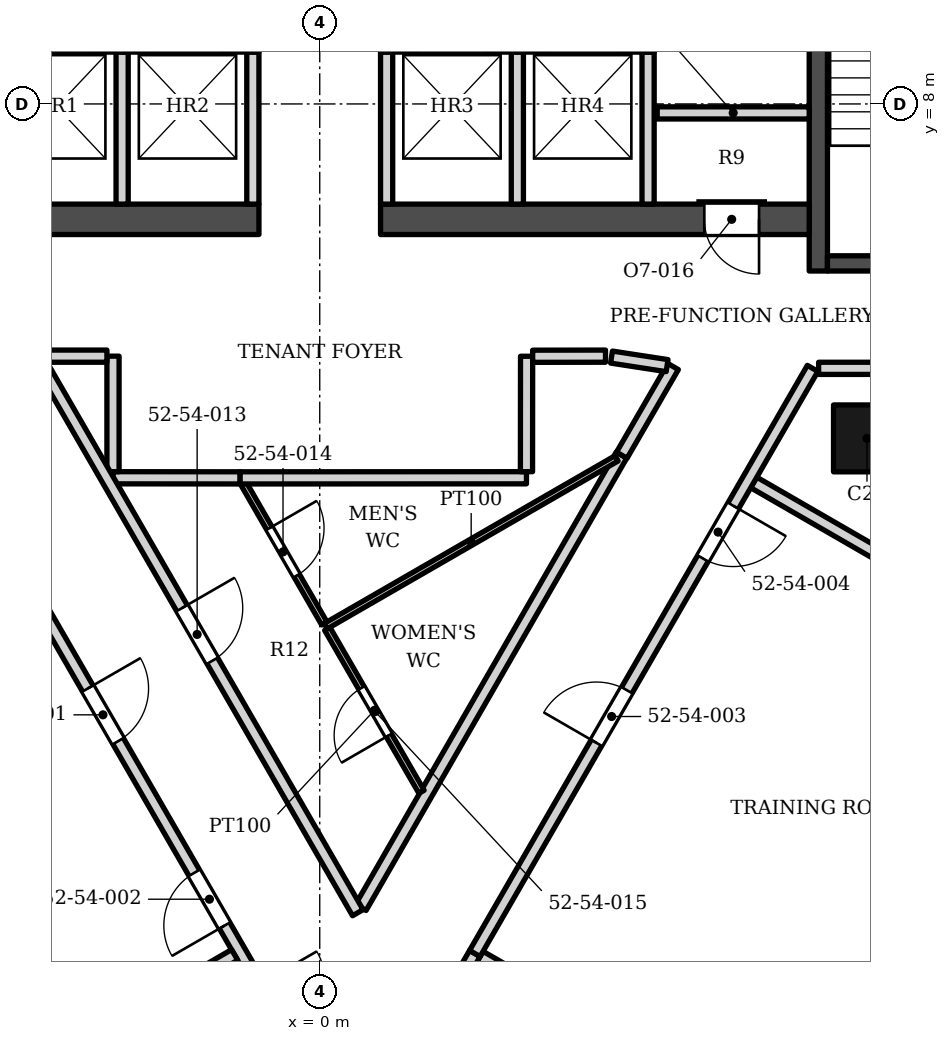
"""IFC4 building model, lengths in metres.
Left out: names, types, materials, properties, quantities, classifications, styles, units other than length and angle.
Written with IfcOpenShell. Run it as: python <this file> out.ifc"""

import sys

from ifc_helpers import new_model, si_unit, direction, frame, frame_2d, origin, origin_2d, place, context, subcontext, project, spatial, rectangle, extrude, element, fill, save


model = new_model("IFC4")
c1 = context("Model", 3, precision=1e-05, world=origin(), true_north=direction((0.0, 1.0)))
c2 = subcontext(c1, "Body", "Model", "MODEL_VIEW")
j1 = project(units=[si_unit("LENGTHUNIT", "METRE"), si_unit("PLANEANGLEUNIT", "RADIAN")], contexts=[c1])
p1 = place(None, origin())
s1 = spatial("IfcSite", under=j1, at=p1, CompositionType="ELEMENT")
p2 = place(p1, origin())
s2 = spatial("IfcBuilding", under=s1, at=p2, CompositionType="ELEMENT")
p3 = place(p2, frame((0.0, 0.0, 219.8)))
s3 = spatial("IfcBuildingStorey", under=s2, at=p3, CompositionType="ELEMENT", Elevation=219.8)
p4 = place(p3, frame((8.2, 5.253, 0.0), z_axis=(0.0, 0.0, 1.0), x_axis=(0.0, 1.0, 0.0)))
e1 = element("IfcWall", 1, at=p4, inside=s3, PredefinedType="SHEAR", context=c2, shape_type="SweptSolid", body=[
    extrude(rectangle(XDim=13.3, YDim=0.3, at=frame_2d((6.65, 0.0))), origin(), (0.0, 0.0, 1.0), 3.9),
])
p5 = place(p4, frame((7.1, 0.0, 0.0)))
e2 = element("IfcOpeningElement", 2, at=p5, cuts=e1, PredefinedType="OPENING", context=c2, shape_type="SweptSolid", body=[
    extrude(rectangle(XDim=1.4, YDim=2.1, at=frame_2d((0.7, 1.05))), frame((0.0, 0.16, 0.0), z_axis=(0.0, -1.0, 0.0), x_axis=(1.0, 0.0, 0.0)), (0.0, 0.0, 1.0), 0.32),
])
p6 = place(p4, frame((5.05, 0.0, 0.0)))
e3 = element("IfcOpeningElement", 3, at=p6, cuts=e1, PredefinedType="OPENING", context=c2, shape_type="SweptSolid", body=[
    extrude(rectangle(XDim=1.4, YDim=2.1, at=frame_2d((0.7, 1.05))), frame((0.0, 0.16, 0.0), z_axis=(0.0, -1.0, 0.0), x_axis=(1.0, 0.0, 0.0)), (0.0, 0.0, 1.0), 0.32),
])
p7 = place(p3, frame((8.35, 5.378, 0.0), z_axis=(0.0, 0.0, 1.0), x_axis=(1.0, 0.0, 0.0)))
e4 = element("IfcWall", 4, at=p7, inside=s3, PredefinedType="SHEAR", context=c2, shape_type="SweptSolid", body=[
    extrude(rectangle(XDim=3.75, YDim=0.25, at=frame_2d((1.875, 0.0))), origin(), (0.0, 0.0, 1.0), 3.9),
])
p8 = place(p3, frame((-8.05, 6.103, 0.0), z_axis=(0.0, 0.0, 1.0), x_axis=(1.0, 0.0, 0.0)))
e5 = element("IfcWall", 5, at=p8, inside=s3, PredefinedType="SHEAR", context=c2, shape_type="SweptSolid", body=[
    extrude(rectangle(XDim=7.05, YDim=0.5, at=frame_2d((3.525, 0.0))), origin(), (0.0, 0.0, 1.0), 3.9),
])
p9 = place(p8, frame((0.825, 0.0, 0.0)))
e6 = element("IfcOpeningElement", 6, at=p9, cuts=e5, PredefinedType="OPENING", context=c2, shape_type="SweptSolid", body=[
    extrude(rectangle(XDim=0.9, YDim=2.1, at=frame_2d((0.45, 1.05))), frame((0.0, 0.26, 0.0), z_axis=(0.0, -1.0, 0.0), x_axis=(1.0, 0.0, 0.0)), (0.0, 0.0, 1.0), 0.52),
])
p10 = place(p3, frame((1.0, 6.103, 0.0), z_axis=(0.0, 0.0, 1.0), x_axis=(1.0, 0.0, 0.0)))
e7 = element("IfcWall", 7, at=p10, inside=s3, PredefinedType="SHEAR", context=c2, shape_type="SweptSolid", body=[
    extrude(rectangle(XDim=7.05, YDim=0.5, at=frame_2d((3.525, 0.0))), origin(), (0.0, 0.0, 1.0), 3.9),
])
p11 = place(p10, frame((5.325, 0.0, 0.0)))
e8 = element("IfcOpeningElement", 8, at=p11, cuts=e7, PredefinedType="OPENING", context=c2, shape_type="SweptSolid", body=[
    extrude(rectangle(XDim=0.9, YDim=2.1, at=frame_2d((0.45, 1.05))), frame((0.0, 0.26, 0.0), z_axis=(0.0, -1.0, 0.0), x_axis=(1.0, 0.0, 0.0)), (0.0, 0.0, 1.0), 0.52),
])
p12 = place(p3, frame((9.0, 2.5, 0.0), z_axis=(0.0, 0.0, 1.0), x_axis=(1.0, 0.0, 0.0)))
e9 = element("IfcColumn", 9, at=p12, inside=s3, PredefinedType="COLUMN", context=c2, shape_type="SweptSolid", body=[
    extrude(rectangle(XDim=1.1, YDim=1.1, at=origin_2d()), origin(), (0.0, 0.0, 1.0), 3.9),
])
for number, where, z_axis, x_axis in (
    (10, (-3.25, 6.353, 0.0), (0.0, 0.0, 1.0), (0.0, 1.0, 0.0)),
    (11, (-1.1, 6.353, 0.0), (0.0, 0.0, 1.0), (0.0, 1.0, 0.0)),
    (12, (1.1, 6.353, 0.0), (0.0, 0.0, 1.0), (0.0, 1.0, 0.0)),
    (13, (3.25, 6.353, 0.0), (0.0, 0.0, 1.0), (0.0, 1.0, 0.0)),
    (14, (5.4, 6.353, 0.0), (0.0, 0.0, 1.0), (0.0, 1.0, 0.0)),
    (15, (5.55, 7.853, 0.0), (0.0, 0.0, 1.0), (1.0, 0.0, 0.0)),
):
    element("IfcWall", number, at=place(p3, frame(where, z_axis=z_axis, x_axis=x_axis)), inside=s3, PredefinedType="SOLIDWALL", context=c2, shape_type="SweptSolid", body=[
        extrude(rectangle(XDim=2.5, YDim=0.2, at=frame_2d((1.25, 0.0))), origin(), (0.0, 0.0, 1.0), 3.73),
    ])
p13 = place(p3, frame((2.635, -6.022, 0.0), z_axis=(0.0, 0.0, 1.0), x_axis=(0.866123944565, -0.499829283508, 0.0)))
e16 = element("IfcWall", 16, at=p13, inside=s3, PredefinedType="PARTITIONING", context=c2, shape_type="SweptSolid", body=[
    extrude(rectangle(XDim=7.65, YDim=0.2, at=frame_2d((3.825, 0.0))), origin(), (0.0, 0.0, 1.0), 2.884),
])
p14 = place(p3, frame((-5.815, 1.851, 0.0), z_axis=(0.0, 0.0, 1.0), x_axis=(0.499991042018, -0.866030575616, 0.0)))
e17 = element("IfcWall", 17, at=p14, inside=s3, PredefinedType="PARTITIONING", context=c2, shape_type="SweptSolid", body=[
    extrude(rectangle(XDim=11.357, YDim=0.2, at=frame_2d((5.678, 0.0))), origin(), (0.0, 0.0, 1.0), 2.884),
])
p15 = place(p14, frame((4.0, 0.0, 0.0)))
e18 = element("IfcOpeningElement", 18, at=p15, cuts=e17, PredefinedType="OPENING", context=c2, shape_type="SweptSolid", body=[
    extrude(rectangle(XDim=1.0, YDim=2.1, at=frame_2d((0.5, 1.05))), frame((0.0, 0.11, 0.0), z_axis=(0.0, -1.0, 0.0), x_axis=(1.0, 0.0, 0.0)), (0.0, 0.0, 1.0), 0.22),
])
p16 = place(p14, frame((7.501, 0.0, 0.0)))
e19 = element("IfcOpeningElement", 19, at=p16, cuts=e17, PredefinedType="OPENING", context=c2, shape_type="SweptSolid", body=[
    extrude(rectangle(XDim=1.0, YDim=2.1, at=frame_2d((0.5, 1.05))), frame((0.0, 0.11, 0.0), z_axis=(0.0, -1.0, 0.0), x_axis=(1.0, 0.0, 0.0)), (0.0, 0.0, 1.0), 0.22),
])
p17 = place(p14, frame((9.627, 0.0, 0.0)))
e20 = element("IfcOpeningElement", 20, at=p17, cuts=e17, PredefinedType="OPENING", context=c2, shape_type="SweptSolid", body=[
    extrude(rectangle(XDim=1.1, YDim=2.1, at=frame_2d((0.55, 1.05))), frame((0.0, 0.11, 0.0), z_axis=(0.0, -1.0, 0.0), x_axis=(1.0, 0.0, 0.0)), (0.0, 0.0, 1.0), 0.22),
])
p18 = place(p3, frame((-8.025, -9.817, 0.0), z_axis=(0.0, 0.0, 1.0), x_axis=(0.866115970796, 0.499843100514, 0.0)))
e21 = element("IfcWall", 21, at=p18, inside=s3, PredefinedType="PARTITIONING", context=c2, shape_type="SweptSolid", body=[
    extrude(rectangle(XDim=7.649, YDim=0.2, at=frame_2d((3.825, 0.0))), origin(), (0.0, 0.0, 1.0), 2.884),
])
p19 = place(p3, frame((0.626, -9.301, 0.0), z_axis=(0.0, 0.0, 1.0), x_axis=(0.500330475361, 0.865834519655, 0.0)))
e22 = element("IfcWall", 22, at=p19, inside=s3, PredefinedType="PARTITIONING", context=c2, shape_type="SweptSolid", body=[
    extrude(rectangle(XDim=3.846, YDim=0.2, at=frame_2d((1.923, 0.0))), origin(), (0.0, 0.0, 1.0), 3.73),
])
p20 = place(p19, frame((1.373, 0.0, 0.0)))
e23 = element("IfcOpeningElement", 23, at=p20, cuts=e22, PredefinedType="OPENING", context=c2, shape_type="SweptSolid", body=[
    extrude(rectangle(XDim=1.1, YDim=2.1, at=frame_2d((0.55, 1.05))), frame((0.0, 0.11, 0.0), z_axis=(0.0, -1.0, 0.0), x_axis=(1.0, 0.0, 0.0)), (0.0, 0.0, 1.0), 0.22),
])
p21 = place(p3, frame((0.676, -5.214, 0.0), z_axis=(0.0, 0.0, 1.0), x_axis=(0.499295729612, 0.866431632843, 0.0)))
e24 = element("IfcWall", 24, at=p21, inside=s3, PredefinedType="PARTITIONING", context=c2, shape_type="SweptSolid", body=[
    extrude(rectangle(XDim=8.586, YDim=0.2, at=frame_2d((4.293, 0.0))), origin(), (0.0, 0.0, 1.0), 2.884),
])
p22 = place(p3, frame((0.124, -0.631, 0.0), z_axis=(0.0, 0.0, 1.0), x_axis=(0.500479866737, -0.865748175274, 0.0)))
e25 = element("IfcWall", 25, at=p22, inside=s3, PredefinedType="PARTITIONING", context=c2, shape_type="SweptSolid", body=[
    extrude(rectangle(XDim=3.097, YDim=0.1, at=frame_2d((1.548, 0.0))), origin(), (0.0, 0.0, 1.0), 2.884),
])
p23 = place(p22, frame((1.124, 0.0, 0.0)))
e26 = element("IfcOpeningElement", 26, at=p23, cuts=e25, PredefinedType="OPENING", context=c2, shape_type="SweptSolid", body=[
    extrude(rectangle(XDim=0.9, YDim=2.1, at=frame_2d((0.45, 1.05))), frame((0.0, 0.06, 0.0), z_axis=(0.0, -1.0, 0.0), x_axis=(1.0, 0.0, 0.0)), (0.0, 0.0, 1.0), 0.12),
])
p24 = place(p3, frame((-1.258, 1.766, 0.0), z_axis=(0.0, 0.0, 1.0), x_axis=(0.50002892151, -0.866008705299, 0.0)))
e27 = element("IfcWall", 27, at=p24, inside=s3, PredefinedType="PARTITIONING", context=c2, shape_type="SweptSolid", body=[
    extrude(rectangle(XDim=2.666, YDim=0.1, at=frame_2d((1.333, 0.0))), origin(), (0.0, 0.0, 1.0), 2.884),
])
p25 = place(p24, frame((0.858, 0.0, 0.0)))
e28 = element("IfcOpeningElement", 28, at=p25, cuts=e27, PredefinedType="OPENING", context=c2, shape_type="SweptSolid", body=[
    extrude(rectangle(XDim=0.9, YDim=2.1, at=frame_2d((0.45, 1.05))), frame((0.0, 0.06, 0.0), z_axis=(0.0, -1.0, 0.0), x_axis=(1.0, 0.0, 0.0)), (0.0, 0.0, 1.0), 0.12),
])
p26 = place(p3, frame((7.137, 1.776, 0.0), z_axis=(0.0, 0.0, 1.0), x_axis=(0.865929891815, -0.500165395106, 0.0)))
e29 = element("IfcWall", 29, at=p26, inside=s3, PredefinedType="PARTITIONING", context=c2, shape_type="SweptSolid", body=[
    extrude(rectangle(XDim=7.649, YDim=0.2, at=frame_2d((3.825, 0.0))), origin(), (0.0, 0.0, 1.0), 3.052),
])
p27 = place(p3, frame((-3.4, 1.852, 0.0), z_axis=(0.0, 0.0, 1.0), x_axis=(0.999999666027, -0.000817279353, 0.0)))
e30 = element("IfcWall", 30, at=p27, inside=s3, PredefinedType="PARTITIONING", context=c2, shape_type="SweptSolid", body=[
    extrude(rectangle(XDim=2.091, YDim=0.2, at=frame_2d((1.045, 0.0))), origin(), (0.0, 0.0, 1.0), 3.73),
])
p28 = place(p3, frame((-1.309, 1.851, 0.0), z_axis=(0.0, 0.0, 1.0), x_axis=(0.999999934138, 0.000362938743, 0.0)))
e31 = element("IfcWall", 31, at=p28, inside=s3, PredefinedType="PARTITIONING", context=c2, shape_type="SweptSolid", body=[
    extrude(rectangle(XDim=4.709, YDim=0.2, at=frame_2d((2.354, 0.0))), origin(), (0.0, 0.0, 1.0), 3.73),
])
p29 = place(p3, frame((-3.4, 3.852, 0.0), z_axis=(0.0, 0.0, 1.0), x_axis=(0.0, -1.0, 0.0)))
e32 = element("IfcWall", 32, at=p29, inside=s3, PredefinedType="PARTITIONING", context=c2, shape_type="SweptSolid", body=[
    extrude(rectangle(XDim=1.9, YDim=0.2, at=frame_2d((0.95, 0.0))), origin(), (0.0, 0.0, 1.0), 3.73),
])
p30 = place(p3, frame((0.099, -0.588, 0.0), z_axis=(0.0, 0.0, 1.0), x_axis=(0.866176017048, 0.49973903939, 0.0)))
e33 = element("IfcWall", 33, at=p30, inside=s3, PredefinedType="PARTITIONING", context=c2, shape_type="SweptSolid", body=[
    extrude(rectangle(XDim=5.522, YDim=0.1, at=frame_2d((2.761, 0.0))), origin(), (0.0, 0.0, 1.0), 2.884),
])
p31 = place(p3, frame((4.968, 2.223, 0.0), z_axis=(0.0, 0.0, 1.0), x_axis=(0.500876298319, 0.865518881239, 0.0)))
e34 = element("IfcWall", 34, at=p31, inside=s3, PredefinedType="PARTITIONING", context=c2, shape_type="SweptSolid", body=[
    extrude(rectangle(XDim=1.685, YDim=0.2, at=frame_2d((0.842, 0.0))), origin(), (0.0, 0.0, 1.0), 3.73),
])
p32 = place(p3, frame((2.551, -5.971, 0.0), z_axis=(0.0, 0.0, 1.0), x_axis=(0.500007765274, 0.866020920455, 0.0)))
e35 = element("IfcWall", 35, at=p32, inside=s3, PredefinedType="PARTITIONING", context=c2, shape_type="SweptSolid", body=[
    extrude(rectangle(XDim=11.111, YDim=0.2, at=frame_2d((5.555, 0.0))), origin(), (0.0, 0.0, 1.0), 2.884),
])
p33 = place(p32, frame((4.0, 0.0, 0.0)))
e36 = element("IfcOpeningElement", 36, at=p33, cuts=e35, PredefinedType="OPENING", context=c2, shape_type="SweptSolid", body=[
    extrude(rectangle(XDim=1.0, YDim=2.1, at=frame_2d((0.5, 1.05))), frame((0.0, 0.11, 0.0), z_axis=(0.0, -1.0, 0.0), x_axis=(1.0, 0.0, 0.0)), (0.0, 0.0, 1.0), 0.22),
])
p34 = place(p32, frame((7.502, 0.0, 0.0)))
e37 = element("IfcOpeningElement", 37, at=p34, cuts=e35, PredefinedType="OPENING", context=c2, shape_type="SweptSolid", body=[
    extrude(rectangle(XDim=1.0, YDim=2.1, at=frame_2d((0.5, 1.05))), frame((0.0, 0.11, 0.0), z_axis=(0.0, -1.0, 0.0), x_axis=(1.0, 0.0, 0.0)), (0.0, 0.0, 1.0), 0.22),
])
p35 = place(p3, frame((8.205, 3.652, 0.0), z_axis=(0.0, 0.0, 1.0), x_axis=(1.0, 0.0, 0.0)))
e38 = element("IfcWall", 38, at=p35, inside=s3, PredefinedType="PARTITIONING", context=c2, shape_type="SweptSolid", body=[
    extrude(rectangle(XDim=7.867, YDim=0.2, at=frame_2d((3.934, 0.0))), origin(), (0.0, 0.0, 1.0), 3.73),
])
p36 = place(p35, frame((3.384, 0.0, 0.0)))
e39 = element("IfcOpeningElement", 39, at=p36, cuts=e38, PredefinedType="OPENING", context=c2, shape_type="SweptSolid", body=[
    extrude(rectangle(XDim=1.0, YDim=2.1, at=frame_2d((0.5, 1.05))), frame((0.0, 0.11, 0.0), z_axis=(0.0, -1.0, 0.0), x_axis=(1.0, 0.0, 0.0)), (0.0, 0.0, 1.0), 0.22),
])
p37 = place(p3, frame((4.799, 3.837, 0.0), z_axis=(0.0, 0.0, 1.0), x_axis=(0.988365591488, -0.152096869008, 0.0)))
e40 = element("IfcWall", 40, at=p37, inside=s3, PredefinedType="PARTITIONING", context=c2, shape_type="SweptSolid", body=[
    extrude(rectangle(XDim=0.925, YDim=0.2, at=frame_2d((0.462, 0.0))), origin(), (0.0, 0.0, 1.0), 3.73),
])
p38 = place(p3, frame((-4.658, 3.852, 0.0), z_axis=(0.0, 0.0, 1.0), x_axis=(0.500012400782, -0.866018244071, 0.0)))
e41 = element("IfcWall", 41, at=p38, inside=s3, PredefinedType="PARTITIONING", context=c2, shape_type="SweptSolid", body=[
    extrude(rectangle(XDim=10.569, YDim=0.2, at=frame_2d((5.284, 0.0))), origin(), (0.0, 0.0, 1.0), 2.884),
])
p39 = place(p38, frame((4.784, 0.0, 0.0)))
e42 = element("IfcOpeningElement", 42, at=p39, cuts=e41, PredefinedType="OPENING", context=c2, shape_type="SweptSolid", body=[
    extrude(rectangle(XDim=1.0, YDim=2.1, at=frame_2d((0.5, 1.05))), frame((0.0, 0.11, 0.0), z_axis=(0.0, -1.0, 0.0), x_axis=(1.0, 0.0, 0.0)), (0.0, 0.0, 1.0), 0.22),
])
p40 = place(p3, frame((-4.558, 3.852, 0.0), z_axis=(0.0, 0.0, 1.0), x_axis=(1.0, 0.0, 0.0)))
e43 = element("IfcWall", 43, at=p40, inside=s3, PredefinedType="PARTITIONING", context=c2, shape_type="SweptSolid", body=[
    extrude(rectangle(XDim=1.058, YDim=0.2, at=frame_2d((0.529, 0.0))), origin(), (0.0, 0.0, 1.0), 2.884),
])
p41 = place(p3, frame((3.4, 1.952, 0.0), z_axis=(0.0, 0.0, 1.0), x_axis=(0.001028938362, 0.999999470643, 0.0)))
e44 = element("IfcWall", 44, at=p41, inside=s3, PredefinedType="PARTITIONING", context=c2, shape_type="SweptSolid", body=[
    extrude(rectangle(XDim=1.898, YDim=0.2, at=frame_2d((0.949, 0.0))), origin(), (0.0, 0.0, 1.0), 3.73),
])
p42 = place(p3, frame((3.502, 3.851, 0.0), z_axis=(0.0, 0.0, 1.0), x_axis=(0.999998982503, 0.001426532072, 0.0)))
e45 = element("IfcWall", 45, at=p42, inside=s3, PredefinedType="PARTITIONING", context=c2, shape_type="SweptSolid", body=[
    extrude(rectangle(XDim=1.198, YDim=0.2, at=frame_2d((0.599, 0.0))), origin(), (0.0, 0.0, 1.0), 3.73),
])
p43 = place(p11, origin())
e46 = element("IfcDoor", 46, at=p43, inside=s3, OperationType="SINGLE_SWING_RIGHT", PredefinedType="DOOR", context=c2, shape_type="SweptSolid", body=[
    extrude(rectangle(XDim=0.9, YDim=2.1, at=frame_2d((0.45, 1.05))), frame((0.0, 0.025, 0.0), z_axis=(0.0, -1.0, 0.0), x_axis=(1.0, 0.0, 0.0)), (0.0, 0.0, 1.0), 0.05),
])
fill(e8, e46)
p44 = place(p15, origin())
e47 = element("IfcDoor", 47, at=p44, inside=s3, OperationType="SINGLE_SWING_LEFT", PredefinedType="DOOR", context=c2, shape_type="SweptSolid", body=[
    extrude(rectangle(XDim=1.0, YDim=2.1, at=frame_2d((0.5, 1.05))), frame((0.0, 0.025, 0.0), z_axis=(0.0, -1.0, 0.0), x_axis=(1.0, 0.0, 0.0)), (0.0, 0.0, 1.0), 0.05),
])
fill(e18, e47)
p45 = place(p16, origin())
e48 = element("IfcDoor", 48, at=p45, inside=s3, OperationType="SINGLE_SWING_RIGHT", PredefinedType="DOOR", context=c2, shape_type="SweptSolid", body=[
    extrude(rectangle(XDim=1.0, YDim=2.1, at=frame_2d((0.5, 1.05))), frame((0.0, 0.025, 0.0), z_axis=(0.0, -1.0, 0.0), x_axis=(1.0, 0.0, 0.0)), (0.0, 0.0, 1.0), 0.05),
])
fill(e19, e48)
p46 = place(p33, origin())
e49 = element("IfcDoor", 49, at=p46, inside=s3, OperationType="SINGLE_SWING_LEFT", PredefinedType="DOOR", context=c2, shape_type="SweptSolid", body=[
    extrude(rectangle(XDim=1.0, YDim=2.1, at=frame_2d((0.5, 1.05))), frame((0.0, 0.025, 0.0), z_axis=(0.0, -1.0, 0.0), x_axis=(1.0, 0.0, 0.0)), (0.0, 0.0, 1.0), 0.05),
])
fill(e36, e49)
p47 = place(p34, origin())
e50 = element("IfcDoor", 50, at=p47, inside=s3, OperationType="SINGLE_SWING_RIGHT", PredefinedType="DOOR", context=c2, shape_type="SweptSolid", body=[
    extrude(rectangle(XDim=1.0, YDim=2.1, at=frame_2d((0.5, 1.05))), frame((0.0, 0.025, 0.0), z_axis=(0.0, -1.0, 0.0), x_axis=(1.0, 0.0, 0.0)), (0.0, 0.0, 1.0), 0.05),
])
fill(e37, e50)
p48 = place(p39, origin())
e51 = element("IfcDoor", 51, at=p48, inside=s3, OperationType="SINGLE_SWING_LEFT", PredefinedType="DOOR", context=c2, shape_type="SweptSolid", body=[
    extrude(rectangle(XDim=1.0, YDim=2.1, at=frame_2d((0.5, 1.05))), frame((0.0, 0.025, 0.0), z_axis=(0.0, -1.0, 0.0), x_axis=(1.0, 0.0, 0.0)), (0.0, 0.0, 1.0), 0.05),
])
fill(e42, e51)
p49 = place(p25, origin())
e52 = element("IfcDoor", 52, at=p49, inside=s3, OperationType="SINGLE_SWING_LEFT", PredefinedType="DOOR", context=c2, shape_type="SweptSolid", body=[
    extrude(rectangle(XDim=0.9, YDim=2.1, at=frame_2d((0.45, 1.05))), frame((0.0, 0.025, 0.0), z_axis=(0.0, -1.0, 0.0), x_axis=(1.0, 0.0, 0.0)), (0.0, 0.0, 1.0), 0.05),
])
fill(e28, e52)
p50 = place(p23, origin())
e53 = element("IfcDoor", 53, at=p50, inside=s3, OperationType="SINGLE_SWING_RIGHT", PredefinedType="DOOR", context=c2, shape_type="SweptSolid", body=[
    extrude(rectangle(XDim=0.9, YDim=2.1, at=frame_2d((0.45, 1.05))), frame((0.0, 0.025, 0.0), z_axis=(0.0, -1.0, 0.0), x_axis=(1.0, 0.0, 0.0)), (0.0, 0.0, 1.0), 0.05),
])
fill(e26, e53)
save(model, sys.argv[1])
